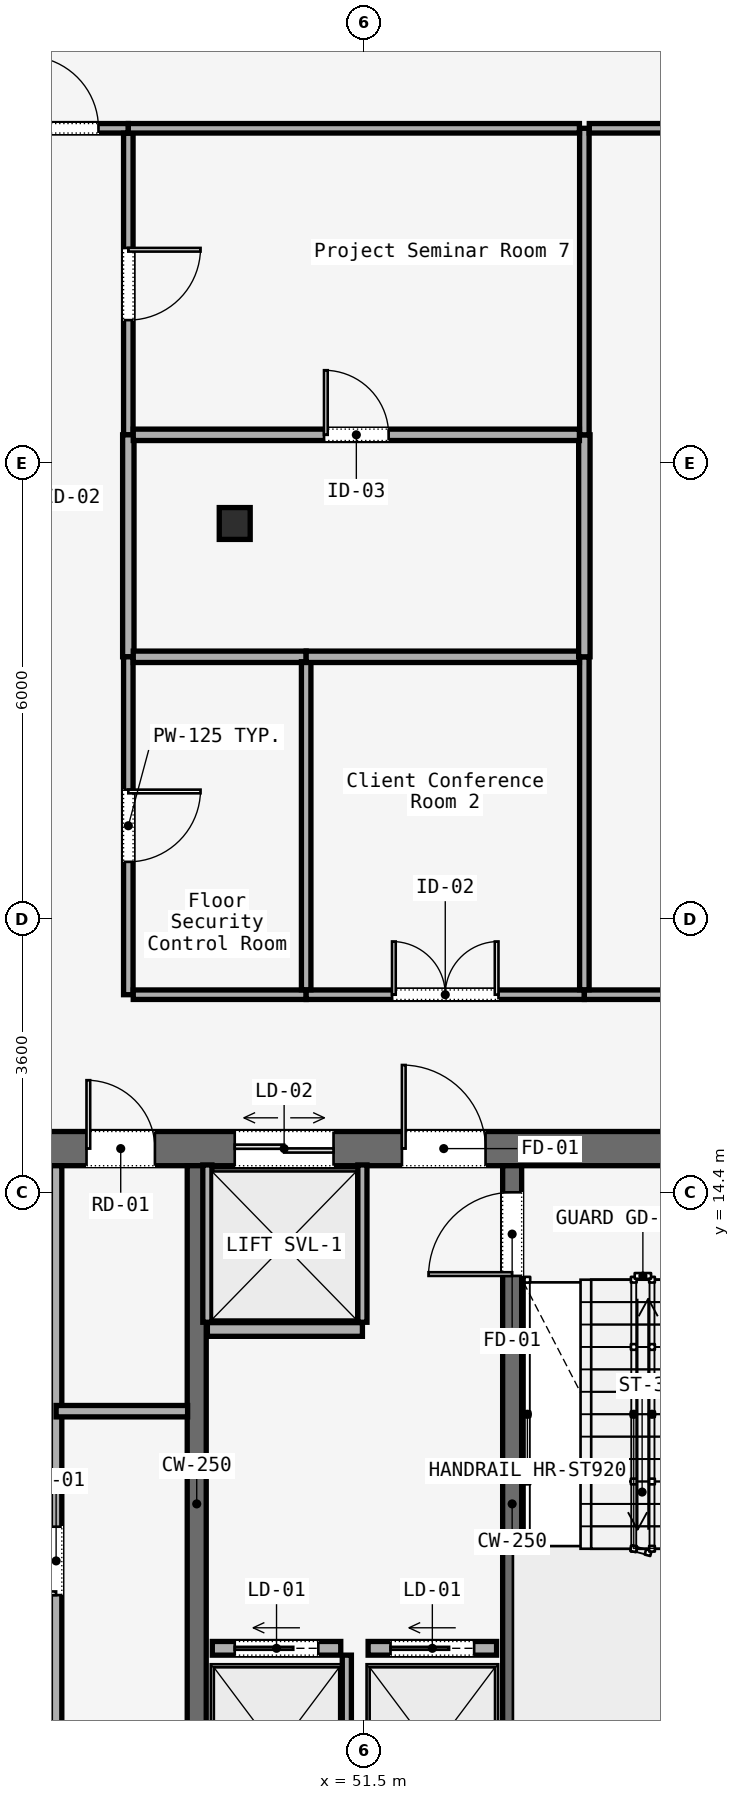
"""IFC4 building model, lengths in metres.
Left out: names, types, materials, properties, quantities, classifications, styles, units other than length and angle.
Written with IfcOpenShell. Run it as: python <this file> out.ifc"""

import sys

from ifc_helpers import new_model, si_unit, direction, frame, frame_2d, origin, origin_2d, place, context, subcontext, project, spatial, rectangle, i_section, extrude, element, fill, save


model = new_model("IFC4")
c1 = context("Model", 3, precision=1e-05, world=origin(), true_north=direction((0.0, 1.0)))
c2 = subcontext(c1, "Body", "Model", "MODEL_VIEW")
j1 = project(units=[si_unit("LENGTHUNIT", "METRE"), si_unit("PLANEANGLEUNIT", "RADIAN")], contexts=[c1])
p1 = place(None, origin())
s1 = spatial("IfcSite", under=j1, at=p1, CompositionType="ELEMENT")
p2 = place(p1, origin())
s2 = spatial("IfcBuilding", under=s1, at=p2, CompositionType="ELEMENT")
p3 = place(p2, frame((0.0, 0.0, 122.2)))
s3 = spatial("IfcBuildingStorey", under=s2, at=p3, CompositionType="ELEMENT", Elevation=122.2)
p4 = place(p3, frame((26.45, 14.975, 0.0), z_axis=(0.0, 0.0, 1.0), x_axis=(1.0, 0.0, 0.0)))
e1 = element("IfcWall", 1, at=p4, inside=s3, PredefinedType="SOLIDWALL", context=c2, shape_type="SweptSolid", body=[
    extrude(rectangle(XDim=31.1, YDim=0.45, at=frame_2d((15.55, 0.0))), origin(), (0.0, 0.0, 1.0), 4.58),
])
p5 = place(p4, frame((1.65, 0.0, 0.0)))
e2 = element("IfcOpeningElement", 2, at=p5, cuts=e1, PredefinedType="OPENING", context=c2, shape_type="SweptSolid", body=[
    extrude(rectangle(XDim=1.1, YDim=2.2, at=frame_2d((0.55, 1.1))), frame((0.0, 0.225, 0.0), z_axis=(0.0, -1.0, 0.0), x_axis=(1.0, 0.0, 0.0)), (0.0, 0.0, 1.0), 0.45),
])
p6 = place(p4, frame((13.65, 0.0, 0.0)))
e3 = element("IfcOpeningElement", 3, at=p6, cuts=e1, PredefinedType="OPENING", context=c2, shape_type="SweptSolid", body=[
    extrude(rectangle(XDim=1.1, YDim=2.2, at=frame_2d((0.55, 1.1))), frame((0.0, 0.225, 0.0), z_axis=(0.0, -1.0, 0.0), x_axis=(1.0, 0.0, 0.0)), (0.0, 0.0, 1.0), 0.45),
])
p7 = place(p4, frame((25.55, 0.0, 0.0)))
e4 = element("IfcOpeningElement", 4, at=p7, cuts=e1, PredefinedType="OPENING", context=c2, shape_type="SweptSolid", body=[
    extrude(rectangle(XDim=1.1, YDim=2.2, at=frame_2d((0.55, 1.1))), frame((0.0, 0.225, 0.0), z_axis=(0.0, -1.0, 0.0), x_axis=(1.0, 0.0, 0.0)), (0.0, 0.0, 1.0), 0.45),
])
p8 = place(p4, frame((10.7, 0.0, 0.0)))
e5 = element("IfcOpeningElement", 5, at=p8, cuts=e1, PredefinedType="OPENING", context=c2, shape_type="SweptSolid", body=[
    extrude(rectangle(XDim=1.4, YDim=2.2, at=frame_2d((0.7, 1.1))), frame((0.0, 0.225, 0.0), z_axis=(0.0, -1.0, 0.0), x_axis=(1.0, 0.0, 0.0)), (0.0, 0.0, 1.0), 0.45),
])
p9 = place(p4, frame((19.35, 0.0, 0.0)))
e6 = element("IfcOpeningElement", 6, at=p9, cuts=e1, PredefinedType="OPENING", context=c2, shape_type="SweptSolid", body=[
    extrude(rectangle(XDim=1.1, YDim=2.2, at=frame_2d((0.55, 1.1))), frame((0.0, 0.225, 0.0), z_axis=(0.0, -1.0, 0.0), x_axis=(1.0, 0.0, 0.0)), (0.0, 0.0, 1.0), 0.45),
])
p10 = place(p4, frame((21.4, 0.0, 0.0)))
e7 = element("IfcOpeningElement", 7, at=p10, cuts=e1, PredefinedType="OPENING", context=c2, shape_type="SweptSolid", body=[
    extrude(rectangle(XDim=0.9, YDim=2.1, at=frame_2d((0.45, 1.05))), frame((0.0, 0.225, 0.0), z_axis=(0.0, -1.0, 0.0), x_axis=(1.0, 0.0, 0.0)), (0.0, 0.0, 1.0), 0.45),
])
p11 = place(p4, frame((23.35, 0.0, 0.0)))
e8 = element("IfcOpeningElement", 8, at=p11, cuts=e1, PredefinedType="OPENING", context=c2, shape_type="SweptSolid", body=[
    extrude(rectangle(XDim=1.3, YDim=2.3, at=frame_2d((0.65, 1.15))), frame((0.0, 0.225, 0.0), z_axis=(0.0, -1.0, 0.0), x_axis=(1.0, 0.0, 0.0)), (0.0, 0.0, 1.0), 0.45),
])
p12 = place(p3, frame((49.3, 5.85, 0.0), z_axis=(0.0, 0.0, 1.0), x_axis=(0.0, 1.0, 0.0)))
e9 = element("IfcWall", 9, at=p12, inside=s3, PredefinedType="SOLIDWALL", context=c2, shape_type="SweptSolid", body=[
    extrude(rectangle(XDim=8.9, YDim=0.25, at=frame_2d((4.45, 0.0))), origin(), (0.0, 0.0, 1.0), 4.58),
])
p13 = place(p3, frame((53.45, 5.85, 0.0), z_axis=(0.0, 0.0, 1.0), x_axis=(0.0, 1.0, 0.0)))
e10 = element("IfcWall", 10, at=p13, inside=s3, PredefinedType="SOLIDWALL", context=c2, shape_type="SweptSolid", body=[
    extrude(rectangle(XDim=8.9, YDim=0.25, at=frame_2d((4.45, 0.0))), origin(), (0.0, 0.0, 1.0), 4.58),
])
p14 = place(p13, frame((7.45, 0.0, 0.0)))
e11 = element("IfcOpeningElement", 11, at=p14, cuts=e10, PredefinedType="OPENING", context=c2, shape_type="SweptSolid", body=[
    extrude(rectangle(XDim=1.1, YDim=2.2, at=frame_2d((0.55, 1.1))), frame((0.0, 0.125, 0.0), z_axis=(0.0, -1.0, 0.0), x_axis=(1.0, 0.0, 0.0)), (0.0, 0.0, 1.0), 0.25),
])
p15 = place(p3, frame((49.8, 23.2, 0.0), z_axis=(0.0, 0.0, 1.0), x_axis=(1.0, 0.0, 0.0)))
e12 = element("IfcColumn", 12, at=p15, inside=s3, PredefinedType="COLUMN", context=c2, shape_type="SweptSolid", body=[
    extrude(i_section(OverallWidth=0.407, OverallDepth=0.419, WebThickness=0.031, FlangeThickness=0.049, FilletRadius=0.015, at=origin_2d()), origin(), (0.0, 0.0, 1.0), 4.58),
])
p16 = place(p3, frame((47.45, 5.9, 0.0), z_axis=(0.0, 0.0, 1.0), x_axis=(0.0, 1.0, 0.0)))
e13 = element("IfcWall", 13, at=p16, inside=s3, PredefinedType="PARTITIONING", context=c2, shape_type="SweptSolid", body=[
    extrude(rectangle(XDim=8.85, YDim=0.15, at=frame_2d((4.425, 0.0))), origin(), (0.0, 0.0, 1.0), 4.01),
])
p17 = place(p16, frame((3.2, 0.0, 0.0)))
e14 = element("IfcOpeningElement", 14, at=p17, cuts=e13, PredefinedType="OPENING", context=c2, shape_type="SweptSolid", body=[
    extrude(rectangle(XDim=0.9, YDim=2.1, at=frame_2d((0.45, 1.05))), frame((0.0, 0.075, 0.0), z_axis=(0.0, -1.0, 0.0), x_axis=(1.0, 0.0, 0.0)), (0.0, 0.0, 1.0), 0.15),
])
p18 = place(p3, frame((47.45, 11.52, 0.0), z_axis=(0.0, 0.0, 1.0), x_axis=(1.0, 0.0, 0.0)))
e15 = element("IfcWall", 15, at=p18, inside=s3, PredefinedType="PARTITIONING", context=c2, shape_type="SweptSolid", body=[
    extrude(rectangle(XDim=1.73, YDim=0.15, at=frame_2d((0.865, 0.0))), origin(), (0.0, 0.0, 1.0), 4.01),
])
p19 = place(p3, frame((49.505, 8.4, 0.0), z_axis=(0.0, 0.0, 1.0), x_axis=(1.0, 0.0, 0.0)))
e16 = element("IfcWall", 16, at=p19, inside=s3, PredefinedType="SOLIDWALL", context=c2, shape_type="SweptSolid", body=[
    extrude(rectangle(XDim=1.69, YDim=0.18, at=frame_2d((0.845, 0.0))), origin(), (0.0, 0.0, 1.0), 4.01),
])
p20 = place(p19, frame((0.295, 0.0, 0.0)))
e17 = element("IfcOpeningElement", 17, at=p20, cuts=e16, PredefinedType="OPENING", context=c2, shape_type="SweptSolid", body=[
    extrude(rectangle(XDim=1.1, YDim=2.2, at=frame_2d((0.55, 1.1))), frame((0.0, 0.09, 0.0), z_axis=(0.0, -1.0, 0.0), x_axis=(1.0, 0.0, 0.0)), (0.0, 0.0, 1.0), 0.18),
])
p21 = place(p3, frame((51.275, 5.93, 0.0), z_axis=(0.0, 0.0, 1.0), x_axis=(0.0, 1.0, 0.0)))
e18 = element("IfcWall", 18, at=p21, inside=s3, PredefinedType="SOLIDWALL", context=c2, shape_type="SweptSolid", body=[
    extrude(rectangle(XDim=2.38, YDim=0.12, at=frame_2d((1.19, 0.0))), origin(), (0.0, 0.0, 1.0), 4.01),
])
p22 = place(p3, frame((51.555, 8.4, 0.0), z_axis=(0.0, 0.0, 1.0), x_axis=(1.0, 0.0, 0.0)))
e19 = element("IfcWall", 19, at=p22, inside=s3, PredefinedType="SOLIDWALL", context=c2, shape_type="SweptSolid", body=[
    extrude(rectangle(XDim=1.69, YDim=0.18, at=frame_2d((0.845, 0.0))), origin(), (0.0, 0.0, 1.0), 4.01),
])
p23 = place(p22, frame((0.295, 0.0, 0.0)))
e20 = element("IfcOpeningElement", 20, at=p23, cuts=e19, PredefinedType="OPENING", context=c2, shape_type="SweptSolid", body=[
    extrude(rectangle(XDim=1.1, YDim=2.2, at=frame_2d((0.55, 1.1))), frame((0.0, 0.09, 0.0), z_axis=(0.0, -1.0, 0.0), x_axis=(1.0, 0.0, 0.0)), (0.0, 0.0, 1.0), 0.18),
])
p24 = place(p3, frame((49.44, 12.595, 0.0), z_axis=(0.0, 0.0, 1.0), x_axis=(1.0, 0.0, 0.0)))
e21 = element("IfcWall", 21, at=p24, inside=s3, PredefinedType="SOLIDWALL", context=c2, shape_type="SweptSolid", body=[
    extrude(rectangle(XDim=2.04, YDim=0.18, at=frame_2d((1.02, 0.0))), origin(), (0.0, 0.0, 1.0), 4.01),
])
for number, where, z_axis, x_axis in (
    (22, (49.44, 12.69, 0.0), (0.0, 0.0, 1.0), (0.0, 1.0, 0.0)),
    (23, (51.48, 12.69, 0.0), (0.0, 0.0, 1.0), (0.0, 1.0, 0.0)),
):
    element("IfcWall", number, at=place(p3, frame(where, z_axis=z_axis, x_axis=x_axis)), inside=s3, PredefinedType="SOLIDWALL", context=c2, shape_type="SweptSolid", body=[
        extrude(rectangle(XDim=2.07, YDim=0.12, at=frame_2d((1.035, 0.0))), origin(), (0.0, 0.0, 1.0), 4.01),
    ])
p25 = place(p3, frame((46.665, 28.4, 0.0), z_axis=(0.0, 0.0, 1.0), x_axis=(1.0, 0.0, 0.0)))
e24 = element("IfcWall", 24, at=p25, inside=s3, PredefinedType="PARTITIONING", context=c2, shape_type="SweptSolid", body=[
    extrude(rectangle(XDim=1.735, YDim=0.125, at=frame_2d((0.867, 0.0))), origin(), (0.0, 0.0, 1.0), 4.01),
])
p26 = place(p25, frame((0.393, 0.0, 0.0)))
e25 = element("IfcOpeningElement", 25, at=p26, cuts=e24, PredefinedType="OPENING", context=c2, shape_type="SweptSolid", body=[
    extrude(rectangle(XDim=0.95, YDim=2.2, at=frame_2d((0.475, 1.1))), frame((0.0, 0.062, 0.0), z_axis=(0.0, -1.0, 0.0), x_axis=(1.0, 0.0, 0.0)), (0.0, 0.0, 1.0), 0.125),
])
p27 = place(p3, frame((48.4, 28.335, 0.0), z_axis=(0.0, 0.0, 1.0), x_axis=(0.0, -1.0, 0.0)))
e26 = element("IfcWall", 26, at=p27, inside=s3, PredefinedType="PARTITIONING", context=c2, shape_type="SweptSolid", body=[
    extrude(rectangle(XDim=3.968, YDim=0.125, at=frame_2d((1.984, 0.0))), origin(), (0.0, 0.0, 1.0), 4.01),
])
p28 = place(p27, frame((1.509, 0.0, 0.0)))
e27 = element("IfcOpeningElement", 27, at=p28, cuts=e26, PredefinedType="OPENING", context=c2, shape_type="SweptSolid", body=[
    extrude(rectangle(XDim=0.95, YDim=2.2, at=frame_2d((0.475, 1.1))), frame((0.0, 0.062, 0.0), z_axis=(0.0, -1.0, 0.0), x_axis=(1.0, 0.0, 0.0)), (0.0, 0.0, 1.0), 0.125),
])
p29 = place(p3, frame((48.4, 24.367, 0.0), z_axis=(0.0, 0.0, 1.0), x_axis=(0.0, -1.0, 0.0)))
e28 = element("IfcWall", 28, at=p29, inside=s3, PredefinedType="PARTITIONING", context=c2, shape_type="SweptSolid", body=[
    extrude(rectangle(XDim=2.921, YDim=0.15, at=frame_2d((1.46, 0.0))), origin(), (0.0, 0.0, 1.0), 4.01),
])
p30 = place(p3, frame((48.4, 21.446, 0.0), z_axis=(0.0, 0.0, 1.0), x_axis=(0.0, -1.0, 0.0)))
e29 = element("IfcWall", 29, at=p30, inside=s3, PredefinedType="PARTITIONING", context=c2, shape_type="SweptSolid", body=[
    extrude(rectangle(XDim=4.446, YDim=0.125, at=frame_2d((2.223, 0.0))), origin(), (0.0, 0.0, 1.0), 4.01),
])
p31 = place(p30, frame((1.748, 0.0, 0.0)))
e30 = element("IfcOpeningElement", 30, at=p31, cuts=e29, PredefinedType="OPENING", context=c2, shape_type="SweptSolid", body=[
    extrude(rectangle(XDim=0.95, YDim=2.2, at=frame_2d((0.475, 1.1))), frame((0.0, 0.062, 0.0), z_axis=(0.0, -1.0, 0.0), x_axis=(1.0, 0.0, 0.0)), (0.0, 0.0, 1.0), 0.125),
])
p32 = place(p3, frame((48.465, 17.0, 0.0), z_axis=(0.0, 0.0, 1.0), x_axis=(1.0, 0.0, 0.0)))
e31 = element("IfcWall", 31, at=p32, inside=s3, PredefinedType="PARTITIONING", context=c2, shape_type="SweptSolid", body=[
    extrude(rectangle(XDim=2.275, YDim=0.125, at=frame_2d((1.137, 0.0))), origin(), (0.0, 0.0, 1.0), 4.01),
])
p33 = place(p3, frame((50.74, 17.0, 0.0), z_axis=(0.0, 0.0, 1.0), x_axis=(1.0, 0.0, 0.0)))
e32 = element("IfcWall", 32, at=p33, inside=s3, PredefinedType="PARTITIONING", context=c2, shape_type="SweptSolid", body=[
    extrude(rectangle(XDim=3.66, YDim=0.125, at=frame_2d((1.83, 0.0))), origin(), (0.0, 0.0, 1.0), 4.01),
])
p34 = place(p33, frame((1.13, 0.0, 0.0)))
e33 = element("IfcOpeningElement", 33, at=p34, cuts=e32, PredefinedType="OPENING", context=c2, shape_type="SweptSolid", body=[
    extrude(rectangle(XDim=1.4, YDim=2.2, at=frame_2d((0.7, 1.1))), frame((0.0, 0.062, 0.0), z_axis=(0.0, -1.0, 0.0), x_axis=(1.0, 0.0, 0.0)), (0.0, 0.0, 1.0), 0.125),
])
p35 = place(p3, frame((54.4, 17.0, 0.0), z_axis=(0.0, 0.0, 1.0), x_axis=(1.0, 0.0, 0.0)))
e34 = element("IfcWall", 34, at=p35, inside=s3, PredefinedType="PARTITIONING", context=c2, shape_type="SweptSolid", body=[
    extrude(rectangle(XDim=3.935, YDim=0.125, at=frame_2d((1.968, 0.0))), origin(), (0.0, 0.0, 1.0), 4.01),
])
p36 = place(p35, frame((1.268, 0.0, 0.0)))
e35 = element("IfcOpeningElement", 35, at=p36, cuts=e34, PredefinedType="OPENING", context=c2, shape_type="SweptSolid", body=[
    extrude(rectangle(XDim=1.4, YDim=2.2, at=frame_2d((0.7, 1.1))), frame((0.0, 0.062, 0.0), z_axis=(0.0, -1.0, 0.0), x_axis=(1.0, 0.0, 0.0)), (0.0, 0.0, 1.0), 0.125),
])
p37 = place(p3, frame((48.465, 21.446, 0.0), z_axis=(0.0, 0.0, 1.0), x_axis=(1.0, 0.0, 0.0)))
e36 = element("IfcWall", 36, at=p37, inside=s3, PredefinedType="PARTITIONING", context=c2, shape_type="SweptSolid", body=[
    extrude(rectangle(XDim=2.275, YDim=0.15, at=frame_2d((1.137, 0.0))), origin(), (0.0, 0.0, 1.0), 4.01),
])
p38 = place(p3, frame((50.74, 21.381, 0.0), z_axis=(0.0, 0.0, 1.0), x_axis=(0.0, -1.0, 0.0)))
e37 = element("IfcWall", 37, at=p38, inside=s3, PredefinedType="PARTITIONING", context=c2, shape_type="SweptSolid", body=[
    extrude(rectangle(XDim=4.316, YDim=0.125, at=frame_2d((2.158, 0.0))), origin(), (0.0, 0.0, 1.0), 4.01),
])
p39 = place(p3, frame((54.4, 21.446, 0.0), z_axis=(0.0, 0.0, 1.0), x_axis=(0.0, -1.0, 0.0)))
e38 = element("IfcWall", 38, at=p39, inside=s3, PredefinedType="PARTITIONING", context=c2, shape_type="SweptSolid", body=[
    extrude(rectangle(XDim=4.381, YDim=0.125, at=frame_2d((2.19, 0.0))), origin(), (0.0, 0.0, 1.0), 4.01),
])
p40 = place(p3, frame((50.74, 21.446, 0.0), z_axis=(0.0, 0.0, 1.0), x_axis=(1.0, 0.0, 0.0)))
e39 = element("IfcWall", 39, at=p40, inside=s3, PredefinedType="PARTITIONING", context=c2, shape_type="SweptSolid", body=[
    extrude(rectangle(XDim=3.595, YDim=0.15, at=frame_2d((1.797, 0.0))), origin(), (0.0, 0.0, 1.0), 4.01),
])
p41 = place(p3, frame((54.4, 21.446, 0.0), z_axis=(0.0, 0.0, 1.0), x_axis=(0.0, 1.0, 0.0)))
e40 = element("IfcWall", 40, at=p41, inside=s3, PredefinedType="PARTITIONING", context=c2, shape_type="SweptSolid", body=[
    extrude(rectangle(XDim=2.921, YDim=0.15, at=frame_2d((1.46, 0.0))), origin(), (0.0, 0.0, 1.0), 4.01),
])
p42 = place(p3, frame((54.4, 24.367, 0.0), z_axis=(0.0, 0.0, 1.0), x_axis=(0.0, 1.0, 0.0)))
e41 = element("IfcWall", 41, at=p42, inside=s3, PredefinedType="PARTITIONING", context=c2, shape_type="SweptSolid", body=[
    extrude(rectangle(XDim=4.033, YDim=0.125, at=frame_2d((2.017, 0.0))), origin(), (0.0, 0.0, 1.0), 4.01),
])
p43 = place(p3, frame((54.465, 28.4, 0.0), z_axis=(0.0, 0.0, 1.0), x_axis=(1.0, 0.0, 0.0)))
e42 = element("IfcWall", 42, at=p43, inside=s3, PredefinedType="PARTITIONING", context=c2, shape_type="SweptSolid", body=[
    extrude(rectangle(XDim=6.531, YDim=0.125, at=frame_2d((3.266, 0.0))), origin(), (0.0, 0.0, 1.0), 4.01),
])
p44 = place(p3, frame((48.465, 24.367, 0.0), z_axis=(0.0, 0.0, 1.0), x_axis=(1.0, 0.0, 0.0)))
e43 = element("IfcWall", 43, at=p44, inside=s3, PredefinedType="PARTITIONING", context=c2, shape_type="SweptSolid", body=[
    extrude(rectangle(XDim=5.87, YDim=0.15, at=frame_2d((2.935, 0.0))), origin(), (0.0, 0.0, 1.0), 4.01),
])
p45 = place(p44, frame((2.51, 0.0, 0.0)))
e44 = element("IfcOpeningElement", 44, at=p45, cuts=e43, PredefinedType="OPENING", context=c2, shape_type="SweptSolid", body=[
    extrude(rectangle(XDim=0.85, YDim=2.15, at=frame_2d((0.425, 1.075))), frame((0.0, 0.075, 0.0), z_axis=(0.0, -1.0, 0.0), x_axis=(1.0, 0.0, 0.0)), (0.0, 0.0, 1.0), 0.15),
])
p46 = place(p3, frame((48.4, 28.4, 0.0), z_axis=(0.0, 0.0, 1.0), x_axis=(1.0, 0.0, 0.0)))
e45 = element("IfcWall", 45, at=p46, inside=s3, PredefinedType="PARTITIONING", context=c2, shape_type="SweptSolid", body=[
    extrude(rectangle(XDim=5.935, YDim=0.125, at=frame_2d((2.968, 0.0))), origin(), (0.0, 0.0, 1.0), 4.01),
])
p47 = place(p7, origin())
e46 = element("IfcDoor", 46, at=p47, inside=s3, OperationType="SINGLE_SWING_RIGHT", PredefinedType="DOOR", context=c2, shape_type="SweptSolid", body=[
    extrude(rectangle(XDim=1.1, YDim=2.2, at=frame_2d((0.55, 1.1))), frame((0.0, 0.025, 0.0), z_axis=(0.0, -1.0, 0.0), x_axis=(1.0, 0.0, 0.0)), (0.0, 0.0, 1.0), 0.05),
])
fill(e4, e46)
p48 = place(p10, origin())
e47 = element("IfcDoor", 47, at=p48, inside=s3, OperationType="SINGLE_SWING_LEFT", PredefinedType="DOOR", context=c2, shape_type="SweptSolid", body=[
    extrude(rectangle(XDim=0.9, YDim=2.1, at=frame_2d((0.45, 1.05))), frame((0.0, 0.025, 0.0), z_axis=(0.0, -1.0, 0.0), x_axis=(1.0, 0.0, 0.0)), (0.0, 0.0, 1.0), 0.05),
])
fill(e7, e47)
p49 = place(p14, origin())
e48 = element("IfcDoor", 48, at=p49, inside=s3, OperationType="SINGLE_SWING_LEFT", PredefinedType="DOOR", context=c2, shape_type="SweptSolid", body=[
    extrude(rectangle(XDim=1.1, YDim=2.2, at=frame_2d((0.55, 1.1))), frame((0.0, 0.025, 0.0), z_axis=(0.0, -1.0, 0.0), x_axis=(1.0, 0.0, 0.0)), (0.0, 0.0, 1.0), 0.05),
])
fill(e11, e48)
p50 = place(p17, origin())
e49 = element("IfcDoor", 49, at=p50, inside=s3, OperationType="SINGLE_SWING_LEFT", PredefinedType="DOOR", context=c2, shape_type="SweptSolid", body=[
    extrude(rectangle(XDim=0.9, YDim=2.1, at=frame_2d((0.45, 1.05))), frame((0.0, 0.025, 0.0), z_axis=(0.0, -1.0, 0.0), x_axis=(1.0, 0.0, 0.0)), (0.0, 0.0, 1.0), 0.05),
])
fill(e14, e49)
p51 = place(p20, origin())
e50 = element("IfcDoor", 50, at=p51, inside=s3, OperationType="SLIDING_TO_LEFT", PredefinedType="DOOR", context=c2, shape_type="SweptSolid", body=[
    extrude(rectangle(XDim=1.1, YDim=2.2, at=frame_2d((0.55, 1.1))), frame((0.0, 0.025, 0.0), z_axis=(0.0, -1.0, 0.0), x_axis=(1.0, 0.0, 0.0)), (0.0, 0.0, 1.0), 0.05),
])
fill(e17, e50)
p52 = place(p23, origin())
e51 = element("IfcDoor", 51, at=p52, inside=s3, OperationType="SLIDING_TO_LEFT", PredefinedType="DOOR", context=c2, shape_type="SweptSolid", body=[
    extrude(rectangle(XDim=1.1, YDim=2.2, at=frame_2d((0.55, 1.1))), frame((0.0, 0.025, 0.0), z_axis=(0.0, -1.0, 0.0), x_axis=(1.0, 0.0, 0.0)), (0.0, 0.0, 1.0), 0.05),
])
fill(e20, e51)
p53 = place(p11, origin())
e52 = element("IfcDoor", 52, at=p53, inside=s3, OperationType="DOUBLE_DOOR_SLIDING", PredefinedType="DOOR", context=c2, shape_type="SweptSolid", body=[
    extrude(rectangle(XDim=1.3, YDim=2.3, at=frame_2d((0.65, 1.15))), frame((0.0, 0.025, 0.0), z_axis=(0.0, -1.0, 0.0), x_axis=(1.0, 0.0, 0.0)), (0.0, 0.0, 1.0), 0.05),
])
fill(e8, e52)
p54 = place(p31, origin())
e53 = element("IfcDoor", 53, at=p54, inside=s3, OperationType="SINGLE_SWING_RIGHT", PredefinedType="DOOR", context=c2, shape_type="SweptSolid", body=[
    extrude(rectangle(XDim=0.95, YDim=2.2, at=frame_2d((0.475, 1.1))), frame((0.0, 0.025, 0.0), z_axis=(0.0, -1.0, 0.0), x_axis=(1.0, 0.0, 0.0)), (0.0, 0.0, 1.0), 0.05),
])
fill(e30, e53)
p55 = place(p34, origin())
e54 = element("IfcDoor", 54, at=p55, inside=s3, OperationType="SINGLE_SWING_LEFT", PredefinedType="DOOR", context=c2, shape_type="SweptSolid", body=[
    extrude(rectangle(XDim=1.4, YDim=2.2, at=frame_2d((0.7, 1.1))), frame((0.0, 0.025, 0.0), z_axis=(0.0, -1.0, 0.0), x_axis=(1.0, 0.0, 0.0)), (0.0, 0.0, 1.0), 0.05),
])
fill(e33, e54)
p56 = place(p45, origin())
e55 = element("IfcDoor", 55, at=p56, inside=s3, OperationType="SINGLE_SWING_LEFT", PredefinedType="DOOR", context=c2, shape_type="SweptSolid", body=[
    extrude(rectangle(XDim=0.85, YDim=2.15, at=frame_2d((0.425, 1.075))), frame((0.0, 0.025, 0.0), z_axis=(0.0, -1.0, 0.0), x_axis=(1.0, 0.0, 0.0)), (0.0, 0.0, 1.0), 0.05),
])
fill(e44, e55)
p57 = place(p28, origin())
e56 = element("IfcDoor", 56, at=p57, inside=s3, OperationType="SINGLE_SWING_LEFT", PredefinedType="DOOR", context=c2, shape_type="SweptSolid", body=[
    extrude(rectangle(XDim=0.95, YDim=2.2, at=frame_2d((0.475, 1.1))), frame((0.0, 0.025, 0.0), z_axis=(0.0, -1.0, 0.0), x_axis=(1.0, 0.0, 0.0)), (0.0, 0.0, 1.0), 0.05),
])
fill(e27, e56)
p58 = place(p26, origin())
e57 = element("IfcDoor", 57, at=p58, inside=s3, OperationType="SINGLE_SWING_LEFT", PredefinedType="DOOR", context=c2, shape_type="SweptSolid", body=[
    extrude(rectangle(XDim=0.95, YDim=2.2, at=frame_2d((0.475, 1.1))), frame((0.0, 0.025, 0.0), z_axis=(0.0, -1.0, 0.0), x_axis=(1.0, 0.0, 0.0)), (0.0, 0.0, 1.0), 0.05),
])
fill(e25, e57)
save(model, sys.argv[1])
